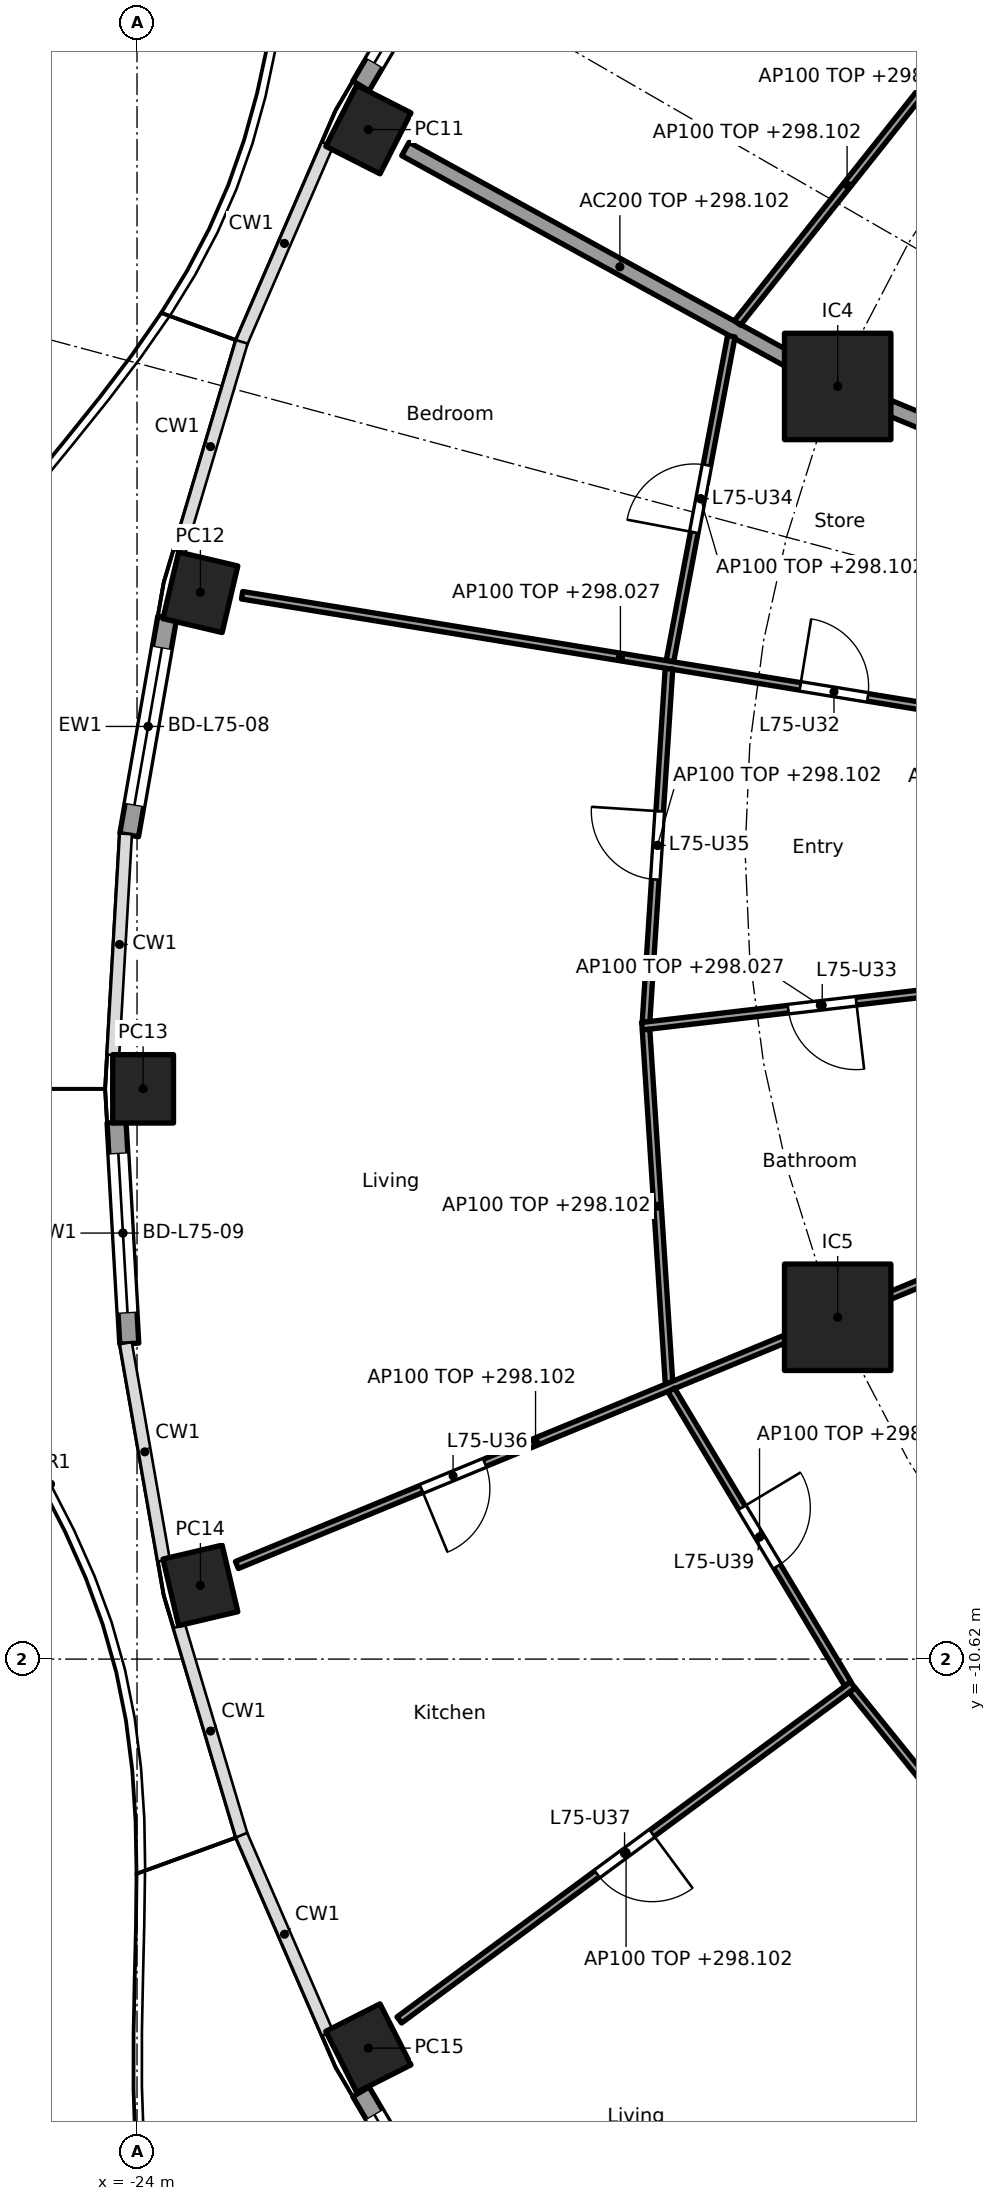
"""IFC4 building model, lengths in metres.
Left out: names, types, materials, properties, quantities, classifications, styles, units other than length and angle.
Written with IfcOpenShell. Run it as: python <this file> out.ifc"""

import sys

from ifc_helpers import new_model, si_unit, direction, frame, frame_2d, origin, origin_2d, place, context, subcontext, project, spatial, rectangle, hollow_rectangle, extrude, element, fill, save


model = new_model("IFC4")
c1 = context("Model", 3, precision=1e-05, world=origin(), true_north=direction((0.0, 1.0)))
c2 = subcontext(c1, "Body", "Model", "MODEL_VIEW")
j1 = project(units=[si_unit("LENGTHUNIT", "METRE"), si_unit("PLANEANGLEUNIT", "RADIAN")], contexts=[c1])
p1 = place(None, origin())
s1 = spatial("IfcSite", under=j1, at=p1, CompositionType="ELEMENT")
p2 = place(p1, origin())
s2 = spatial("IfcBuilding", under=s1, at=p2, CompositionType="ELEMENT")
p3 = place(p2, frame((0.0, 0.0, 295.5)))
s3 = spatial("IfcBuildingStorey", under=s2, at=p3, CompositionType="ELEMENT", Elevation=295.5)
for number, where, z_axis, x_axis in (
    (1, (-20.957, 9.502, 0.0), (0.0, 0.0, 1.0), (-0.452, -0.892, 0.0)),
    (2, (-23.166, 3.415, 0.0), (0.0, 0.0, 1.0), (-0.229, -0.973, 0.0)),
    (3, (-23.92, -3.118, 0.0), (0.0, 0.0, 1.0), (0.0, -1.0, 0.0)),
    (4, (-23.166, -9.65, 0.0), (0.0, 0.0, 1.0), (0.229, -0.973, 0.0)),
    (5, (-20.957, -15.738, 0.0), (0.0, 0.0, 1.0), (0.452, -0.892, 0.0)),
):
    element("IfcColumn", number, at=place(p3, frame(where, z_axis=z_axis, x_axis=x_axis)), inside=s3, PredefinedType="COLUMN", context=c2, shape_type="SweptSolid", body=[
        extrude(hollow_rectangle(XDim=0.9, YDim=0.8, WallThickness=0.028, at=origin_2d()), origin(), (0.0, 0.0, 1.0), 3.7),
    ])
for number, where, z_axis, x_axis in (
    (6, (-14.782, 6.123, 0.0), (0.0, 0.0, 1.0), (1.0, 0.0, 0.0)),
    (7, (-14.782, -6.123, 0.0), (0.0, 0.0, 1.0), (1.0, 0.0, 0.0)),
):
    element("IfcColumn", number, at=place(p3, frame(where, z_axis=z_axis, x_axis=x_axis)), inside=s3, PredefinedType="COLUMN", context=c2, shape_type="SweptSolid", body=[
        extrude(rectangle(XDim=1.4, YDim=1.4, at=origin_2d()), origin(), (0.0, 0.0, 1.0), 3.7),
    ])
p4 = place(p3, frame((-21.054, 10.077, 0.0), z_axis=(0.0, 0.0, 1.0), x_axis=(0.506371364425, 0.862315511452, 0.0)))
e8 = element("IfcWall", 8, at=p4, inside=s3, PredefinedType="SOLIDWALL", context=c2, shape_type="SweptSolid", body=[
    extrude(rectangle(XDim=2.796, YDim=0.25, at=frame_2d((1.398, 0.0))), origin(), (0.0, 0.0, 1.0), 3.28),
])
p5 = place(p4, frame((0.348, 0.0, 0.0)))
e9 = element("IfcOpeningElement", 9, at=p5, cuts=e8, PredefinedType="OPENING", context=c2, shape_type="SweptSolid", body=[
    extrude(rectangle(XDim=2.1, YDim=2.4, at=frame_2d((1.05, 1.2))), frame((0.0, 0.135, 0.0), z_axis=(0.0, -1.0, 0.0), x_axis=(1.0, 0.0, 0.0)), (0.0, 0.0, 1.0), 0.27),
])
p6 = place(p3, frame((-24.103, 0.22, 0.0), z_axis=(0.0, 0.0, 1.0), x_axis=(0.172182411767, 0.985065082661, 0.0)))
e10 = element("IfcWall", 10, at=p6, inside=s3, PredefinedType="SOLIDWALL", context=c2, shape_type="SweptSolid", body=[
    extrude(rectangle(XDim=2.903, YDim=0.25, at=frame_2d((1.451, 0.0))), origin(), (0.0, 0.0, 1.0), 3.28),
])
p7 = place(p6, frame((0.401, 0.0, 0.0)))
e11 = element("IfcOpeningElement", 11, at=p7, cuts=e10, PredefinedType="OPENING", context=c2, shape_type="SweptSolid", body=[
    extrude(rectangle(XDim=2.1, YDim=2.4, at=frame_2d((1.05, 1.2))), frame((0.0, 0.135, 0.0), z_axis=(0.0, -1.0, 0.0), x_axis=(1.0, 0.0, 0.0)), (0.0, 0.0, 1.0), 0.27),
])
p8 = place(p3, frame((-24.102, -6.47, 0.0), z_axis=(0.0, 0.0, 1.0), x_axis=(-0.057450463359, 0.99834835817, 0.0)))
e12 = element("IfcWall", 12, at=p8, inside=s3, PredefinedType="SOLIDWALL", context=c2, shape_type="SweptSolid", body=[
    extrude(rectangle(XDim=2.915, YDim=0.25, at=frame_2d((1.458, 0.0))), origin(), (0.0, 0.0, 1.0), 3.28),
])
p9 = place(p8, frame((0.408, 0.0, 0.0)))
e13 = element("IfcOpeningElement", 13, at=p9, cuts=e12, PredefinedType="OPENING", context=c2, shape_type="SweptSolid", body=[
    extrude(rectangle(XDim=2.1, YDim=2.4, at=frame_2d((1.05, 1.2))), frame((0.0, 0.135, 0.0), z_axis=(0.0, -1.0, 0.0), x_axis=(1.0, 0.0, 0.0)), (0.0, 0.0, 1.0), 0.27),
])
p10 = place(p3, frame((-19.638, -18.724, 0.0), z_axis=(0.0, 0.0, 1.0), x_axis=(-0.506371364425, 0.862315511452, 0.0)))
e14 = element("IfcWall", 14, at=p10, inside=s3, PredefinedType="SOLIDWALL", context=c2, shape_type="SweptSolid", body=[
    extrude(rectangle(XDim=2.796, YDim=0.25, at=frame_2d((1.398, 0.0))), origin(), (0.0, 0.0, 1.0), 3.28),
])
p11 = place(p10, frame((0.348, 0.0, 0.0)))
e15 = element("IfcOpeningElement", 15, at=p11, cuts=e14, PredefinedType="OPENING", context=c2, shape_type="SweptSolid", body=[
    extrude(rectangle(XDim=2.1, YDim=2.4, at=frame_2d((1.05, 1.2))), frame((0.0, 0.135, 0.0), z_axis=(0.0, -1.0, 0.0), x_axis=(1.0, 0.0, 0.0)), (0.0, 0.0, 1.0), 0.27),
])
p12 = place(p3, frame((-12.657, 5.243, 0.0), z_axis=(0.0, 0.0, 1.0), x_axis=(-0.923869415315, 0.382707856524, 0.0)))
e16 = element("IfcWall", 16, at=p12, inside=s3, PredefinedType="PARTITIONING", context=c2, shape_type="SweptSolid", body=[
    extrude(rectangle(XDim=2.2, YDim=0.2, at=frame_2d((1.1, 0.0))), origin(), (0.0, 0.0, 1.0), 3.28),
])
p13 = place(p3, frame((-14.826, 6.147, 0.0), z_axis=(0.0, 0.0, 1.0), x_axis=(-0.876484755865, 0.481429613481, 0.0)))
e17 = element("IfcWall", 17, at=p13, inside=s3, PredefinedType="PARTITIONING", context=c2, shape_type="SweptSolid", body=[
    extrude(rectangle(XDim=6.439, YDim=0.2, at=frame_2d((3.219, 0.0))), origin(), (0.0, 0.0, 1.0), 2.602),
])
p14 = place(p3, frame((-10.183, 7.727, 0.0), z_axis=(0.0, 0.0, 1.0), x_axis=(-0.719063433856, 0.694944442449, 0.0)))
e18 = element("IfcWall", 18, at=p14, inside=s3, PredefinedType="PARTITIONING", context=c2, shape_type="SweptSolid", body=[
    extrude(rectangle(XDim=9.535, YDim=0.1, at=frame_2d((4.768, 0.0))), origin(), (0.0, 0.0, 1.0), 2.527),
])
p15 = place(p14, frame((1.637, 0.0, 0.0)))
e19 = element("IfcOpeningElement", 19, at=p15, cuts=e18, PredefinedType="OPENING", context=c2, shape_type="SweptSolid", body=[
    extrude(rectangle(XDim=0.9, YDim=2.1, at=frame_2d((0.45, 1.05))), frame((0.0, 0.06, 0.0), z_axis=(0.0, -1.0, 0.0), x_axis=(1.0, 0.0, 0.0)), (0.0, 0.0, 1.0), 0.12),
])
p16 = place(p14, frame((6.405, 0.0, 0.0)))
e20 = element("IfcOpeningElement", 20, at=p16, cuts=e18, PredefinedType="OPENING", context=c2, shape_type="SweptSolid", body=[
    extrude(rectangle(XDim=0.9, YDim=2.1, at=frame_2d((0.45, 1.05))), frame((0.0, 0.06, 0.0), z_axis=(0.0, -1.0, 0.0), x_axis=(1.0, 0.0, 0.0)), (0.0, 0.0, 1.0), 0.12),
])
p17 = place(p3, frame((-13.216, 10.589, 0.0), z_axis=(0.0, 0.0, 1.0), x_axis=(-0.622251572882, -0.782817335045, 0.0)))
e21 = element("IfcWall", 21, at=p17, inside=s3, PredefinedType="PARTITIONING", context=c2, shape_type="SweptSolid", body=[
    extrude(rectangle(XDim=4.636, YDim=0.1, at=frame_2d((2.318, 0.0))), origin(), (0.0, 0.0, 1.0), 2.602),
])
p18 = place(p3, frame((-16.181, 6.783, 0.0), z_axis=(0.0, 0.0, 1.0), x_axis=(-0.185670583745, -0.982612046706, 0.0)))
e22 = element("IfcWall", 22, at=p18, inside=s3, PredefinedType="PARTITIONING", context=c2, shape_type="SweptSolid", body=[
    extrude(rectangle(XDim=4.351, YDim=0.1, at=frame_2d((2.176, 0.0))), origin(), (0.0, 0.0, 1.0), 2.602),
])
p19 = place(p18, frame((1.726, 0.0, 0.0)))
e23 = element("IfcOpeningElement", 23, at=p19, cuts=e22, PredefinedType="OPENING", context=c2, shape_type="SweptSolid", body=[
    extrude(rectangle(XDim=0.9, YDim=2.1, at=frame_2d((0.45, 1.05))), frame((0.0, 0.06, 0.0), z_axis=(0.0, -1.0, 0.0), x_axis=(1.0, 0.0, 0.0)), (0.0, 0.0, 1.0), 0.12),
])
p20 = place(p3, frame((-12.664, 1.751, 0.0), z_axis=(0.0, 0.0, 1.0), x_axis=(-0.986935394566, 0.161116501183, 0.0)))
e24 = element("IfcWall", 24, at=p20, inside=s3, PredefinedType="PARTITIONING", context=c2, shape_type="SweptSolid", body=[
    extrude(rectangle(XDim=10.086, YDim=0.1, at=frame_2d((5.043, 0.0))), origin(), (0.0, 0.0, 1.0), 2.527),
])
p21 = place(p20, frame((1.746, 0.0, 0.0)))
e25 = element("IfcOpeningElement", 25, at=p21, cuts=e24, PredefinedType="OPENING", context=c2, shape_type="SweptSolid", body=[
    extrude(rectangle(XDim=0.9, YDim=2.1, at=frame_2d((0.45, 1.05))), frame((0.0, 0.06, 0.0), z_axis=(0.0, -1.0, 0.0), x_axis=(1.0, 0.0, 0.0)), (0.0, 0.0, 1.0), 0.12),
])
p22 = place(p3, frame((-17.002, 2.409, 0.0), z_axis=(0.0, 0.0, 1.0), x_axis=(-0.064855550758, -0.997894662545, 0.0)))
e26 = element("IfcWall", 26, at=p22, inside=s3, PredefinedType="PARTITIONING", context=c2, shape_type="SweptSolid", body=[
    extrude(rectangle(XDim=4.656, YDim=0.1, at=frame_2d((2.328, 0.0))), origin(), (0.0, 0.0, 1.0), 2.602),
])
p23 = place(p22, frame((1.878, 0.0, 0.0)))
e27 = element("IfcOpeningElement", 27, at=p23, cuts=e26, PredefinedType="OPENING", context=c2, shape_type="SweptSolid", body=[
    extrude(rectangle(XDim=0.9, YDim=2.1, at=frame_2d((0.45, 1.05))), frame((0.0, 0.06, 0.0), z_axis=(0.0, -1.0, 0.0), x_axis=(1.0, 0.0, 0.0)), (0.0, 0.0, 1.0), 0.12),
])
p24 = place(p3, frame((-12.664, -1.746, 0.0), z_axis=(0.0, 0.0, 1.0), x_axis=(-0.993265121683, -0.115863704621, 0.0)))
e28 = element("IfcWall", 28, at=p24, inside=s3, PredefinedType="PARTITIONING", context=c2, shape_type="SweptSolid", body=[
    extrude(rectangle(XDim=4.724, YDim=0.1, at=frame_2d((2.362, 0.0))), origin(), (0.0, 0.0, 1.0), 2.527),
])
p25 = place(p24, frame((1.887, 0.0, 0.0)))
e29 = element("IfcOpeningElement", 29, at=p25, cuts=e28, PredefinedType="OPENING", context=c2, shape_type="SweptSolid", body=[
    extrude(rectangle(XDim=0.9, YDim=2.1, at=frame_2d((0.45, 1.05))), frame((0.0, 0.06, 0.0), z_axis=(0.0, -1.0, 0.0), x_axis=(1.0, 0.0, 0.0)), (0.0, 0.0, 1.0), 0.12),
])
p26 = place(p3, frame((-17.304, -2.338, 0.0), z_axis=(0.0, 0.0, 1.0), x_axis=(0.064981578354, -0.99788646372, 0.0)))
e30 = element("IfcWall", 30, at=p26, inside=s3, PredefinedType="PARTITIONING", context=c2, shape_type="SweptSolid", body=[
    extrude(rectangle(XDim=4.659, YDim=0.1, at=frame_2d((2.329, 0.0))), origin(), (0.0, 0.0, 1.0), 2.602),
])
p27 = place(p3, frame((-12.657, -5.243, 0.0), z_axis=(0.0, 0.0, 1.0), x_axis=(-0.923871314276, -0.382703272338, 0.0)))
e31 = element("IfcWall", 31, at=p27, inside=s3, PredefinedType="PARTITIONING", context=c2, shape_type="SweptSolid", body=[
    extrude(rectangle(XDim=2.249, YDim=0.1, at=frame_2d((1.125, 0.0))), origin(), (0.0, 0.0, 1.0), 3.28),
])
p28 = place(p3, frame((-14.828, -6.142, 0.0), z_axis=(0.0, 0.0, 1.0), x_axis=(-0.924478087429, -0.381235184451, 0.0)))
e32 = element("IfcWall", 32, at=p28, inside=s3, PredefinedType="PARTITIONING", context=c2, shape_type="SweptSolid", body=[
    extrude(rectangle(XDim=8.499, YDim=0.1, at=frame_2d((4.25, 0.0))), origin(), (0.0, 0.0, 1.0), 2.602),
])
p29 = place(p28, frame((4.973, 0.0, 0.0)))
e33 = element("IfcOpeningElement", 33, at=p29, cuts=e32, PredefinedType="OPENING", context=c2, shape_type="SweptSolid", body=[
    extrude(rectangle(XDim=0.9, YDim=2.1, at=frame_2d((0.45, 1.05))), frame((0.0, 0.06, 0.0), z_axis=(0.0, -1.0, 0.0), x_axis=(1.0, 0.0, 0.0)), (0.0, 0.0, 1.0), 0.12),
])
p30 = place(p3, frame((-16.972, -7.08, 0.0), z_axis=(0.0, 0.0, 1.0), x_axis=(0.514989049311, -0.857196756346, 0.0)))
e34 = element("IfcWall", 34, at=p30, inside=s3, PredefinedType="PARTITIONING", context=c2, shape_type="SweptSolid", body=[
    extrude(rectangle(XDim=4.512, YDim=0.1, at=frame_2d((2.256, 0.0))), origin(), (0.0, 0.0, 1.0), 2.602),
])
p31 = place(p30, frame((1.806, 0.0, 0.0)))
e35 = element("IfcOpeningElement", 35, at=p31, cuts=e34, PredefinedType="OPENING", context=c2, shape_type="SweptSolid", body=[
    extrude(rectangle(XDim=0.9, YDim=2.1, at=frame_2d((0.45, 1.05))), frame((0.0, 0.06, 0.0), z_axis=(0.0, -1.0, 0.0), x_axis=(1.0, 0.0, 0.0)), (0.0, 0.0, 1.0), 0.12),
])
p32 = place(p3, frame((-14.582, -10.96, 0.0), z_axis=(0.0, 0.0, 1.0), x_axis=(-0.804405200554, -0.594081032623, 0.0)))
e36 = element("IfcWall", 36, at=p32, inside=s3, PredefinedType="PARTITIONING", context=c2, shape_type="SweptSolid", body=[
    extrude(rectangle(XDim=7.418, YDim=0.1, at=frame_2d((3.709, 0.0))), origin(), (0.0, 0.0, 1.0), 2.602),
])
p33 = place(p32, frame((3.284, 0.0, 0.0)))
e37 = element("IfcOpeningElement", 37, at=p33, cuts=e36, PredefinedType="OPENING", context=c2, shape_type="SweptSolid", body=[
    extrude(rectangle(XDim=0.9, YDim=2.1, at=frame_2d((0.45, 1.05))), frame((0.0, 0.06, 0.0), z_axis=(0.0, -1.0, 0.0), x_axis=(1.0, 0.0, 0.0)), (0.0, 0.0, 1.0), 0.12),
])
p34 = place(p3, frame((-14.591, -11.029, 0.0), z_axis=(0.0, 0.0, 1.0), x_axis=(0.628170338674, -0.778075848237, 0.0)))
e38 = element("IfcWall", 38, at=p34, inside=s3, PredefinedType="PARTITIONING", context=c2, shape_type="SweptSolid", body=[
    extrude(rectangle(XDim=4.532, YDim=0.1, at=frame_2d((2.266, 0.0))), origin(), (0.0, 0.0, 1.0), 2.602),
])
p35 = place(p34, frame((2.949, 0.0, 0.0)))
e39 = element("IfcOpeningElement", 39, at=p35, cuts=e38, PredefinedType="OPENING", context=c2, shape_type="SweptSolid", body=[
    extrude(rectangle(XDim=0.9, YDim=2.1, at=frame_2d((0.45, 1.05))), frame((0.0, 0.06, 0.0), z_axis=(0.0, -1.0, 0.0), x_axis=(1.0, 0.0, 0.0)), (0.0, 0.0, 1.0), 0.12),
])
p36 = place(p3, frame((-11.679, -14.557, 0.0), z_axis=(0.0, 0.0, 1.0), x_axis=(-0.670800011545, -0.741638284146, 0.0)))
e40 = element("IfcWall", 40, at=p36, inside=s3, PredefinedType="PARTITIONING", context=c2, shape_type="SweptSolid", body=[
    extrude(rectangle(XDim=8.068, YDim=0.1, at=frame_2d((4.034, 0.0))), origin(), (0.0, 0.0, 1.0), 2.602),
])
p37 = place(p36, frame((3.609, 0.0, 0.0)))
e41 = element("IfcOpeningElement", 41, at=p37, cuts=e40, PredefinedType="OPENING", context=c2, shape_type="SweptSolid", body=[
    extrude(rectangle(XDim=0.9, YDim=2.1, at=frame_2d((0.45, 1.05))), frame((0.0, 0.06, 0.0), z_axis=(0.0, -1.0, 0.0), x_axis=(1.0, 0.0, 0.0)), (0.0, 0.0, 1.0), 0.12),
])
p38 = place(p5, origin())
e42 = element("IfcDoor", 42, at=p38, inside=s3, OperationType="SLIDING_TO_LEFT", PredefinedType="DOOR", context=c2, shape_type="SweptSolid", body=[
    extrude(rectangle(XDim=2.1, YDim=2.4, at=frame_2d((1.05, 1.2))), frame((0.0, 0.025, 0.0), z_axis=(0.0, -1.0, 0.0), x_axis=(1.0, 0.0, 0.0)), (0.0, 0.0, 1.0), 0.05),
])
fill(e9, e42)
p39 = place(p7, origin())
e43 = element("IfcDoor", 43, at=p39, inside=s3, OperationType="SLIDING_TO_LEFT", PredefinedType="DOOR", context=c2, shape_type="SweptSolid", body=[
    extrude(rectangle(XDim=2.1, YDim=2.4, at=frame_2d((1.05, 1.2))), frame((0.0, 0.025, 0.0), z_axis=(0.0, -1.0, 0.0), x_axis=(1.0, 0.0, 0.0)), (0.0, 0.0, 1.0), 0.05),
])
fill(e11, e43)
p40 = place(p9, origin())
e44 = element("IfcDoor", 44, at=p40, inside=s3, OperationType="SLIDING_TO_LEFT", PredefinedType="DOOR", context=c2, shape_type="SweptSolid", body=[
    extrude(rectangle(XDim=2.1, YDim=2.4, at=frame_2d((1.05, 1.2))), frame((0.0, 0.025, 0.0), z_axis=(0.0, -1.0, 0.0), x_axis=(1.0, 0.0, 0.0)), (0.0, 0.0, 1.0), 0.05),
])
fill(e13, e44)
p41 = place(p11, origin())
e45 = element("IfcDoor", 45, at=p41, inside=s3, OperationType="SLIDING_TO_LEFT", PredefinedType="DOOR", context=c2, shape_type="SweptSolid", body=[
    extrude(rectangle(XDim=2.1, YDim=2.4, at=frame_2d((1.05, 1.2))), frame((0.0, 0.025, 0.0), z_axis=(0.0, -1.0, 0.0), x_axis=(1.0, 0.0, 0.0)), (0.0, 0.0, 1.0), 0.05),
])
fill(e15, e45)
p42 = place(p21, frame((0.9, 0.0, 0.0), x_axis=(-1.0, 0.0, 0.0)))
e46 = element("IfcDoor", 46, at=p42, inside=s3, OperationType="SINGLE_SWING_LEFT", PredefinedType="DOOR", context=c2, shape_type="SweptSolid", body=[
    extrude(rectangle(XDim=0.9, YDim=2.1, at=frame_2d((0.45, 1.05))), frame((0.0, 0.025, 0.0), z_axis=(0.0, -1.0, 0.0), x_axis=(1.0, 0.0, 0.0)), (0.0, 0.0, 1.0), 0.05),
])
fill(e25, e46)
p43 = place(p25, origin())
e47 = element("IfcDoor", 47, at=p43, inside=s3, OperationType="SINGLE_SWING_LEFT", PredefinedType="DOOR", context=c2, shape_type="SweptSolid", body=[
    extrude(rectangle(XDim=0.9, YDim=2.1, at=frame_2d((0.45, 1.05))), frame((0.0, 0.025, 0.0), z_axis=(0.0, -1.0, 0.0), x_axis=(1.0, 0.0, 0.0)), (0.0, 0.0, 1.0), 0.05),
])
fill(e29, e47)
p44 = place(p19, frame((0.9, 0.0, 0.0), x_axis=(-1.0, 0.0, 0.0)))
e48 = element("IfcDoor", 48, at=p44, inside=s3, OperationType="SINGLE_SWING_LEFT", PredefinedType="DOOR", context=c2, shape_type="SweptSolid", body=[
    extrude(rectangle(XDim=0.9, YDim=2.1, at=frame_2d((0.45, 1.05))), frame((0.0, 0.025, 0.0), z_axis=(0.0, -1.0, 0.0), x_axis=(1.0, 0.0, 0.0)), (0.0, 0.0, 1.0), 0.05),
])
fill(e23, e48)
p45 = place(p23, frame((0.9, 0.0, 0.0), x_axis=(-1.0, 0.0, 0.0)))
e49 = element("IfcDoor", 49, at=p45, inside=s3, OperationType="SINGLE_SWING_RIGHT", PredefinedType="DOOR", context=c2, shape_type="SweptSolid", body=[
    extrude(rectangle(XDim=0.9, YDim=2.1, at=frame_2d((0.45, 1.05))), frame((0.0, 0.025, 0.0), z_axis=(0.0, -1.0, 0.0), x_axis=(1.0, 0.0, 0.0)), (0.0, 0.0, 1.0), 0.05),
])
fill(e27, e49)
p46 = place(p29, origin())
e50 = element("IfcDoor", 50, at=p46, inside=s3, OperationType="SINGLE_SWING_RIGHT", PredefinedType="DOOR", context=c2, shape_type="SweptSolid", body=[
    extrude(rectangle(XDim=0.9, YDim=2.1, at=frame_2d((0.45, 1.05))), frame((0.0, 0.025, 0.0), z_axis=(0.0, -1.0, 0.0), x_axis=(1.0, 0.0, 0.0)), (0.0, 0.0, 1.0), 0.05),
])
fill(e33, e50)
p47 = place(p33, origin())
e51 = element("IfcDoor", 51, at=p47, inside=s3, OperationType="SINGLE_SWING_LEFT", PredefinedType="DOOR", context=c2, shape_type="SweptSolid", body=[
    extrude(rectangle(XDim=0.9, YDim=2.1, at=frame_2d((0.45, 1.05))), frame((0.0, 0.025, 0.0), z_axis=(0.0, -1.0, 0.0), x_axis=(1.0, 0.0, 0.0)), (0.0, 0.0, 1.0), 0.05),
])
fill(e37, e51)
p48 = place(p31, origin())
e52 = element("IfcDoor", 52, at=p48, inside=s3, OperationType="SINGLE_SWING_LEFT", PredefinedType="DOOR", context=c2, shape_type="SweptSolid", body=[
    extrude(rectangle(XDim=0.9, YDim=2.1, at=frame_2d((0.45, 1.05))), frame((0.0, 0.025, 0.0), z_axis=(0.0, -1.0, 0.0), x_axis=(1.0, 0.0, 0.0)), (0.0, 0.0, 1.0), 0.05),
])
fill(e35, e52)
save(model, sys.argv[1])
